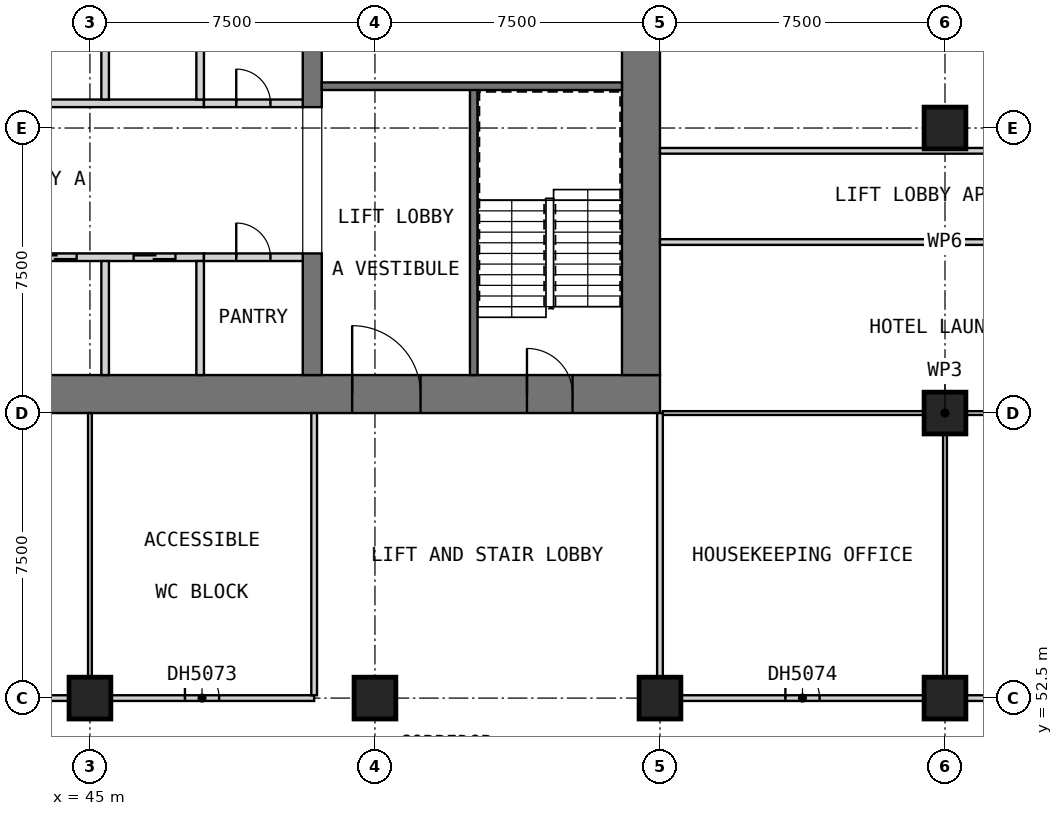
"""IFC4 building model, lengths in metres.
Left out: names, types, materials, properties, quantities, classifications, styles, units other than length and angle.
Written with IfcOpenShell. Run it as: python <this file> out.ifc"""

import sys

from ifc_helpers import new_model, si_unit, direction, frame, frame_2d, origin, origin_2d, place, context, subcontext, project, spatial, rectangle, extrude, element, fill, save


model = new_model("IFC4")
c1 = context("Model", 3, precision=1e-05, world=origin(), true_north=direction((0.0, 1.0)))
c2 = subcontext(c1, "Body", "Model", "MODEL_VIEW")
j1 = project(units=[si_unit("LENGTHUNIT", "METRE"), si_unit("PLANEANGLEUNIT", "RADIAN")], contexts=[c1])
p1 = place(None, origin())
s1 = spatial("IfcSite", under=j1, at=p1, CompositionType="ELEMENT")
p2 = place(p1, origin())
s2 = spatial("IfcBuilding", under=s1, at=p2, CompositionType="ELEMENT")
p3 = place(p2, frame((0.0, 0.0, 93.5)))
s3 = spatial("IfcBuildingStorey", under=s2, at=p3, CompositionType="ELEMENT", Elevation=93.5)
for number, where, z_axis, x_axis in (
    (1, (45.0, 52.5, 0.0), (0.0, 0.0, 1.0), (1.0, 0.0, 0.0)),
    (2, (52.5, 52.5, 0.0), (0.0, 0.0, 1.0), (1.0, 0.0, 0.0)),
    (3, (60.0, 52.5, 0.0), (0.0, 0.0, 1.0), (1.0, 0.0, 0.0)),
    (4, (67.5, 52.5, 0.0), (0.0, 0.0, 1.0), (1.0, 0.0, 0.0)),
    (5, (67.5, 60.0, 0.0), (0.0, 0.0, 1.0), (1.0, 0.0, 0.0)),
    (6, (67.5, 67.5, 0.0), (0.0, 0.0, 1.0), (1.0, 0.0, 0.0)),
):
    element("IfcColumn", number, at=place(p3, frame(where, z_axis=z_axis, x_axis=x_axis)), inside=s3, PredefinedType="COLUMN", context=c2, shape_type="SweptSolid", body=[
        extrude(rectangle(XDim=1.1, YDim=1.1, at=origin_2d()), origin(), (0.0, 0.0, 1.0), 3.6),
    ])
p4 = place(p3, frame((30.0, 60.5, 0.0), z_axis=(0.0, 0.0, 1.0), x_axis=(1.0, 0.0, 0.0)))
e7 = element("IfcWall", 7, at=p4, inside=s3, PredefinedType="SHEAR", context=c2, shape_type="SweptSolid", body=[
    extrude(rectangle(XDim=30.0, YDim=1.0, at=frame_2d((15.0, 0.0))), origin(), (0.0, 0.0, 1.0), 3.6),
])
p5 = place(p4, frame((21.9, 0.0, 0.0)))
e8 = element("IfcOpeningElement", 8, at=p5, cuts=e7, PredefinedType="OPENING", context=c2, shape_type="SweptSolid", body=[
    extrude(rectangle(XDim=1.8, YDim=2.1, at=frame_2d((0.9, 1.05))), frame((0.0, 0.51, 0.0), z_axis=(0.0, -1.0, 0.0), x_axis=(1.0, 0.0, 0.0)), (0.0, 0.0, 1.0), 1.02),
])
p6 = place(p4, frame((26.5, 0.0, 0.0)))
e9 = element("IfcOpeningElement", 9, at=p6, cuts=e7, PredefinedType="OPENING", context=c2, shape_type="SweptSolid", body=[
    extrude(rectangle(XDim=1.2, YDim=2.1, at=frame_2d((0.6, 1.05))), frame((0.0, 0.51, 0.0), z_axis=(0.0, -1.0, 0.0), x_axis=(1.0, 0.0, 0.0)), (0.0, 0.0, 1.0), 1.02),
])
p7 = place(p3, frame((59.5, 61.0, 0.0), z_axis=(0.0, 0.0, 1.0), x_axis=(0.0, 1.0, 0.0)))
e10 = element("IfcWall", 10, at=p7, inside=s3, PredefinedType="SHEAR", context=c2, shape_type="SweptSolid", body=[
    extrude(rectangle(XDim=20.5, YDim=1.0, at=frame_2d((10.25, 0.0))), origin(), (0.0, 0.0, 1.0), 3.6),
])
p8 = place(p7, frame((14.5, 0.0, 0.0)))
e11 = element("IfcOpeningElement", 11, at=p8, cuts=e10, PredefinedType="OPENING", context=c2, shape_type="SweptSolid", body=[
    extrude(rectangle(XDim=1.8, YDim=2.1, at=frame_2d((0.9, 1.05))), frame((0.0, 0.51, 0.0), z_axis=(0.0, -1.0, 0.0), x_axis=(1.0, 0.0, 0.0)), (0.0, 0.0, 1.0), 1.02),
])
p9 = place(p3, frame((50.85, 61.0, 0.0), z_axis=(0.0, 0.0, 1.0), x_axis=(0.0, 1.0, 0.0)))
e12 = element("IfcWall", 12, at=p9, inside=s3, PredefinedType="SHEAR", context=c2, shape_type="SweptSolid", body=[
    extrude(rectangle(XDim=3.2, YDim=0.5, at=frame_2d((1.6, 0.0))), origin(), (0.0, 0.0, 1.0), 3.6),
])
p10 = place(p3, frame((50.85, 68.05, 0.0), z_axis=(0.0, 0.0, 1.0), x_axis=(0.0, 1.0, 0.0)))
e13 = element("IfcWall", 13, at=p10, inside=s3, PredefinedType="SHEAR", context=c2, shape_type="SweptSolid", body=[
    extrude(rectangle(XDim=6.4, YDim=0.5, at=frame_2d((3.2, 0.0))), origin(), (0.0, 0.0, 1.0), 3.6),
])
p11 = place(p3, frame((35.0, 64.1, 0.0), z_axis=(0.0, 0.0, 1.0), x_axis=(1.0, 0.0, 0.0)))
e14 = element("IfcWall", 14, at=p11, inside=s3, PredefinedType="SOLIDWALL", context=c2, shape_type="SweptSolid", body=[
    extrude(rectangle(XDim=13.0, YDim=0.2, at=frame_2d((6.5, 0.0))), origin(), (0.0, 0.0, 1.0), 3.6),
])
p12 = place(p11, frame((0.75, 0.0, 0.0)))
e15 = element("IfcOpeningElement", 15, at=p12, cuts=e14, PredefinedType="OPENING", context=c2, shape_type="SweptSolid", body=[
    extrude(rectangle(XDim=1.1, YDim=2.1, at=frame_2d((0.55, 1.05))), frame((0.0, 0.11, 0.0), z_axis=(0.0, -1.0, 0.0), x_axis=(1.0, 0.0, 0.0)), (0.0, 0.0, 1.0), 0.22),
])
p13 = place(p11, frame((3.35, 0.0, 0.0)))
e16 = element("IfcOpeningElement", 16, at=p13, cuts=e14, PredefinedType="OPENING", context=c2, shape_type="SweptSolid", body=[
    extrude(rectangle(XDim=1.1, YDim=2.1, at=frame_2d((0.55, 1.05))), frame((0.0, 0.11, 0.0), z_axis=(0.0, -1.0, 0.0), x_axis=(1.0, 0.0, 0.0)), (0.0, 0.0, 1.0), 0.22),
])
p14 = place(p11, frame((5.95, 0.0, 0.0)))
e17 = element("IfcOpeningElement", 17, at=p14, cuts=e14, PredefinedType="OPENING", context=c2, shape_type="SweptSolid", body=[
    extrude(rectangle(XDim=1.1, YDim=2.1, at=frame_2d((0.55, 1.05))), frame((0.0, 0.11, 0.0), z_axis=(0.0, -1.0, 0.0), x_axis=(1.0, 0.0, 0.0)), (0.0, 0.0, 1.0), 0.22),
])
p15 = place(p11, frame((8.55, 0.0, 0.0)))
e18 = element("IfcOpeningElement", 18, at=p15, cuts=e14, PredefinedType="OPENING", context=c2, shape_type="SweptSolid", body=[
    extrude(rectangle(XDim=1.1, YDim=2.1, at=frame_2d((0.55, 1.05))), frame((0.0, 0.11, 0.0), z_axis=(0.0, -1.0, 0.0), x_axis=(1.0, 0.0, 0.0)), (0.0, 0.0, 1.0), 0.22),
])
p16 = place(p11, frame((11.15, 0.0, 0.0)))
e19 = element("IfcOpeningElement", 19, at=p16, cuts=e14, PredefinedType="OPENING", context=c2, shape_type="SweptSolid", body=[
    extrude(rectangle(XDim=1.1, YDim=2.1, at=frame_2d((0.55, 1.05))), frame((0.0, 0.11, 0.0), z_axis=(0.0, -1.0, 0.0), x_axis=(1.0, 0.0, 0.0)), (0.0, 0.0, 1.0), 0.22),
])
for number, where, z_axis, x_axis in (
    (20, (45.4, 61.0, 0.0), (0.0, 0.0, 1.0), (0.0, 1.0, 0.0)),
    (21, (47.9, 61.0, 0.0), (0.0, 0.0, 1.0), (0.0, 1.0, 0.0)),
):
    element("IfcWall", number, at=place(p3, frame(where, z_axis=z_axis, x_axis=x_axis)), inside=s3, PredefinedType="SOLIDWALL", context=c2, shape_type="SweptSolid", body=[
        extrude(rectangle(XDim=3.0, YDim=0.2, at=frame_2d((1.5, 0.0))), origin(), (0.0, 0.0, 1.0), 3.6),
    ])
p17 = place(p3, frame((48.0, 64.1, 0.0), z_axis=(0.0, 0.0, 1.0), x_axis=(1.0, 0.0, 0.0)))
e22 = element("IfcWall", 22, at=p17, inside=s3, PredefinedType="PARTITIONING", context=c2, shape_type="SweptSolid", body=[
    extrude(rectangle(XDim=2.6, YDim=0.2, at=frame_2d((1.3, 0.0))), origin(), (0.0, 0.0, 1.0), 3.35),
])
p18 = place(p17, frame((0.85, 0.0, 0.0)))
e23 = element("IfcOpeningElement", 23, at=p18, cuts=e22, PredefinedType="OPENING", context=c2, shape_type="SweptSolid", body=[
    extrude(rectangle(XDim=0.9, YDim=2.1, at=frame_2d((0.45, 1.05))), frame((0.0, 0.11, 0.0), z_axis=(0.0, -1.0, 0.0), x_axis=(1.0, 0.0, 0.0)), (0.0, 0.0, 1.0), 0.22),
])
p19 = place(p3, frame((35.0, 68.15, 0.0), z_axis=(0.0, 0.0, 1.0), x_axis=(1.0, 0.0, 0.0)))
e24 = element("IfcWall", 24, at=p19, inside=s3, PredefinedType="SOLIDWALL", context=c2, shape_type="SweptSolid", body=[
    extrude(rectangle(XDim=13.0, YDim=0.2, at=frame_2d((6.5, 0.0))), origin(), (0.0, 0.0, 1.0), 3.6),
])
p20 = place(p19, frame((0.75, 0.0, 0.0)))
e25 = element("IfcOpeningElement", 25, at=p20, cuts=e24, PredefinedType="OPENING", context=c2, shape_type="SweptSolid", body=[
    extrude(rectangle(XDim=1.1, YDim=2.1, at=frame_2d((0.55, 1.05))), frame((0.0, 0.11, 0.0), z_axis=(0.0, -1.0, 0.0), x_axis=(1.0, 0.0, 0.0)), (0.0, 0.0, 1.0), 0.22),
])
for number, where, z_axis, x_axis in (
    (26, (45.4, 68.25, 0.0), (0.0, 0.0, 1.0), (0.0, 1.0, 0.0)),
    (27, (47.9, 68.25, 0.0), (0.0, 0.0, 1.0), (0.0, 1.0, 0.0)),
):
    element("IfcWall", number, at=place(p3, frame(where, z_axis=z_axis, x_axis=x_axis)), inside=s3, PredefinedType="SOLIDWALL", context=c2, shape_type="SweptSolid", body=[
        extrude(rectangle(XDim=2.75, YDim=0.2, at=frame_2d((1.375, 0.0))), origin(), (0.0, 0.0, 1.0), 3.6),
    ])
p21 = place(p3, frame((48.0, 68.15, 0.0), z_axis=(0.0, 0.0, 1.0), x_axis=(1.0, 0.0, 0.0)))
e28 = element("IfcWall", 28, at=p21, inside=s3, PredefinedType="PARTITIONING", context=c2, shape_type="SweptSolid", body=[
    extrude(rectangle(XDim=2.6, YDim=0.2, at=frame_2d((1.3, 0.0))), origin(), (0.0, 0.0, 1.0), 3.35),
])
p22 = place(p21, frame((0.85, 0.0, 0.0)))
e29 = element("IfcOpeningElement", 29, at=p22, cuts=e28, PredefinedType="OPENING", context=c2, shape_type="SweptSolid", body=[
    extrude(rectangle(XDim=0.9, YDim=2.1, at=frame_2d((0.45, 1.05))), frame((0.0, 0.11, 0.0), z_axis=(0.0, -1.0, 0.0), x_axis=(1.0, 0.0, 0.0)), (0.0, 0.0, 1.0), 0.22),
])
p23 = place(p3, frame((55.1, 61.0, 0.0), z_axis=(0.0, 0.0, 1.0), x_axis=(0.0, 1.0, 0.0)))
e30 = element("IfcWall", 30, at=p23, inside=s3, PredefinedType="SOLIDWALL", context=c2, shape_type="SweptSolid", body=[
    extrude(rectangle(XDim=7.6, YDim=0.2, at=frame_2d((3.8, 0.0))), origin(), (0.0, 0.0, 1.0), 3.35),
])
p24 = place(p3, frame((51.1, 68.6, 0.0), z_axis=(0.0, 0.0, 1.0), x_axis=(1.0, 0.0, 0.0)))
e31 = element("IfcWall", 31, at=p24, inside=s3, PredefinedType="SOLIDWALL", context=c2, shape_type="SweptSolid", body=[
    extrude(rectangle(XDim=7.9, YDim=0.2, at=frame_2d((3.95, 0.0))), origin(), (0.0, 0.0, 1.0), 3.35),
])
p25 = place(p3, frame((33.75, 52.5, 0.0), z_axis=(0.0, 0.0, 1.0), x_axis=(1.0, 0.0, 0.0)))
e32 = element("IfcWall", 32, at=p25, inside=s3, PredefinedType="PARTITIONING", context=c2, shape_type="SweptSolid", body=[
    extrude(rectangle(XDim=17.15, YDim=0.15, at=frame_2d((8.575, 0.0))), origin(), (0.0, 0.0, 1.0), 3.35),
])
p26 = place(p25, frame((5.175, 0.0, 0.0)))
e33 = element("IfcOpeningElement", 33, at=p26, cuts=e32, PredefinedType="OPENING", context=c2, shape_type="SweptSolid", body=[
    extrude(rectangle(XDim=0.9, YDim=2.1, at=frame_2d((0.45, 1.05))), frame((0.0, 0.085, 0.0), z_axis=(0.0, -1.0, 0.0), x_axis=(1.0, 0.0, 0.0)), (0.0, 0.0, 1.0), 0.17),
])
p27 = place(p25, frame((13.75, 0.0, 0.0)))
e34 = element("IfcOpeningElement", 34, at=p27, cuts=e32, PredefinedType="OPENING", context=c2, shape_type="SweptSolid", body=[
    extrude(rectangle(XDim=0.9, YDim=2.1, at=frame_2d((0.45, 1.05))), frame((0.0, 0.085, 0.0), z_axis=(0.0, -1.0, 0.0), x_axis=(1.0, 0.0, 0.0)), (0.0, 0.0, 1.0), 0.17),
])
p28 = place(p3, frame((60.0, 52.5, 0.0), z_axis=(0.0, 0.0, 1.0), x_axis=(1.0, 0.0, 0.0)))
e35 = element("IfcWall", 35, at=p28, inside=s3, PredefinedType="PARTITIONING", context=c2, shape_type="SweptSolid", body=[
    extrude(rectangle(XDim=15.0, YDim=0.15, at=frame_2d((7.5, 0.0))), origin(), (0.0, 0.0, 1.0), 3.35),
])
p29 = place(p28, frame((3.3, 0.0, 0.0)))
e36 = element("IfcOpeningElement", 36, at=p29, cuts=e35, PredefinedType="OPENING", context=c2, shape_type="SweptSolid", body=[
    extrude(rectangle(XDim=0.9, YDim=2.1, at=frame_2d((0.45, 1.05))), frame((0.0, 0.085, 0.0), z_axis=(0.0, -1.0, 0.0), x_axis=(1.0, 0.0, 0.0)), (0.0, 0.0, 1.0), 0.17),
])
p30 = place(p28, frame((10.8, 0.0, 0.0)))
e37 = element("IfcOpeningElement", 37, at=p30, cuts=e35, PredefinedType="OPENING", context=c2, shape_type="SweptSolid", body=[
    extrude(rectangle(XDim=0.9, YDim=2.1, at=frame_2d((0.45, 1.05))), frame((0.0, 0.085, 0.0), z_axis=(0.0, -1.0, 0.0), x_axis=(1.0, 0.0, 0.0)), (0.0, 0.0, 1.0), 0.17),
])
p31 = place(p3, frame((60.075, 60.0, 0.0), z_axis=(0.0, 0.0, 1.0), x_axis=(1.0, 0.0, 0.0)))
e38 = element("IfcWall", 38, at=p31, inside=s3, PredefinedType="PARTITIONING", context=c2, shape_type="SweptSolid", body=[
    extrude(rectangle(XDim=14.85, YDim=0.1, at=frame_2d((7.425, 0.0))), origin(), (0.0, 0.0, 1.0), 3.35),
])
p32 = place(p3, frame((45.0, 52.575, 0.0), z_axis=(0.0, 0.0, 1.0), x_axis=(0.0, 1.0, 0.0)))
e39 = element("IfcWall", 39, at=p32, inside=s3, PredefinedType="PARTITIONING", context=c2, shape_type="SweptSolid", body=[
    extrude(rectangle(XDim=7.425, YDim=0.1, at=frame_2d((3.712, 0.0))), origin(), (0.0, 0.0, 1.0), 3.35),
])
p33 = place(p3, frame((67.5, 52.575, 0.0), z_axis=(0.0, 0.0, 1.0), x_axis=(0.0, 1.0, 0.0)))
e40 = element("IfcWall", 40, at=p33, inside=s3, PredefinedType="PARTITIONING", context=c2, shape_type="SweptSolid", body=[
    extrude(rectangle(XDim=7.375, YDim=0.1, at=frame_2d((3.688, 0.0))), origin(), (0.0, 0.0, 1.0), 3.35),
])
for number, where, z_axis, x_axis in (
    (41, (60.0, 64.5, 0.0), (0.0, 0.0, 1.0), (1.0, 0.0, 0.0)),
    (42, (60.0, 66.9, 0.0), (0.0, 0.0, 1.0), (1.0, 0.0, 0.0)),
):
    element("IfcWall", number, at=place(p3, frame(where, z_axis=z_axis, x_axis=x_axis)), inside=s3, PredefinedType="PARTITIONING", context=c2, shape_type="SweptSolid", body=[
        extrude(rectangle(XDim=15.0, YDim=0.15, at=frame_2d((7.5, 0.0))), origin(), (0.0, 0.0, 1.0), 3.35),
    ])
for number, where, z_axis, x_axis in (
    (43, (50.9, 52.575, 0.0), (0.0, 0.0, 1.0), (0.0, 1.0, 0.0)),
    (44, (60.0, 52.575, 0.0), (0.0, 0.0, 1.0), (0.0, 1.0, 0.0)),
):
    element("IfcWall", number, at=place(p3, frame(where, z_axis=z_axis, x_axis=x_axis)), inside=s3, PredefinedType="PARTITIONING", context=c2, shape_type="SweptSolid", body=[
        extrude(rectangle(XDim=7.425, YDim=0.15, at=frame_2d((3.712, 0.0))), origin(), (0.0, 0.0, 1.0), 3.35),
    ])
p34 = place(p15, origin())
e45 = element("IfcDoor", 45, at=p34, inside=s3, OperationType="DOUBLE_DOOR_SLIDING", PredefinedType="DOOR", context=c2, shape_type="SweptSolid", body=[
    extrude(rectangle(XDim=1.1, YDim=2.1, at=frame_2d((0.55, 1.05))), frame((0.0, 0.025, 0.0), z_axis=(0.0, -1.0, 0.0), x_axis=(1.0, 0.0, 0.0)), (0.0, 0.0, 1.0), 0.05),
])
fill(e18, e45)
p35 = place(p16, origin())
e46 = element("IfcDoor", 46, at=p35, inside=s3, OperationType="DOUBLE_DOOR_SLIDING", PredefinedType="DOOR", context=c2, shape_type="SweptSolid", body=[
    extrude(rectangle(XDim=1.1, YDim=2.1, at=frame_2d((0.55, 1.05))), frame((0.0, 0.025, 0.0), z_axis=(0.0, -1.0, 0.0), x_axis=(1.0, 0.0, 0.0)), (0.0, 0.0, 1.0), 0.05),
])
fill(e19, e46)
p36 = place(p18, origin())
e47 = element("IfcDoor", 47, at=p36, inside=s3, OperationType="SINGLE_SWING_RIGHT", PredefinedType="DOOR", context=c2, shape_type="SweptSolid", body=[
    extrude(rectangle(XDim=0.9, YDim=2.1, at=frame_2d((0.45, 1.05))), frame((0.0, 0.025, 0.0), z_axis=(0.0, -1.0, 0.0), x_axis=(1.0, 0.0, 0.0)), (0.0, 0.0, 1.0), 0.05),
])
fill(e23, e47)
p37 = place(p22, origin())
e48 = element("IfcDoor", 48, at=p37, inside=s3, OperationType="SINGLE_SWING_RIGHT", PredefinedType="DOOR", context=c2, shape_type="SweptSolid", body=[
    extrude(rectangle(XDim=0.9, YDim=2.1, at=frame_2d((0.45, 1.05))), frame((0.0, 0.025, 0.0), z_axis=(0.0, -1.0, 0.0), x_axis=(1.0, 0.0, 0.0)), (0.0, 0.0, 1.0), 0.05),
])
fill(e29, e48)
p38 = place(p5, origin())
e49 = element("IfcDoor", 49, at=p38, inside=s3, OperationType="DOUBLE_DOOR_SINGLE_SWING", PredefinedType="DOOR", context=c2, shape_type="SweptSolid", body=[
    extrude(rectangle(XDim=1.8, YDim=2.1, at=frame_2d((0.9, 1.05))), frame((0.0, 0.025, 0.0), z_axis=(0.0, -1.0, 0.0), x_axis=(1.0, 0.0, 0.0)), (0.0, 0.0, 1.0), 0.05),
])
fill(e8, e49)
p39 = place(p6, origin())
e50 = element("IfcDoor", 50, at=p39, inside=s3, OperationType="SINGLE_SWING_LEFT", PredefinedType="DOOR", context=c2, shape_type="SweptSolid", body=[
    extrude(rectangle(XDim=1.2, YDim=2.1, at=frame_2d((0.6, 1.05))), frame((0.0, 0.025, 0.0), z_axis=(0.0, -1.0, 0.0), x_axis=(1.0, 0.0, 0.0)), (0.0, 0.0, 1.0), 0.05),
])
fill(e9, e50)
p40 = place(p27, origin())
e51 = element("IfcDoor", 51, at=p40, inside=s3, OperationType="SINGLE_SWING_LEFT", PredefinedType="DOOR", context=c2, shape_type="SweptSolid", body=[
    extrude(rectangle(XDim=0.9, YDim=2.1, at=frame_2d((0.45, 1.05))), frame((0.0, 0.025, 0.0), z_axis=(0.0, -1.0, 0.0), x_axis=(1.0, 0.0, 0.0)), (0.0, 0.0, 1.0), 0.05),
])
fill(e34, e51)
p41 = place(p29, origin())
e52 = element("IfcDoor", 52, at=p41, inside=s3, OperationType="SINGLE_SWING_LEFT", PredefinedType="DOOR", context=c2, shape_type="SweptSolid", body=[
    extrude(rectangle(XDim=0.9, YDim=2.1, at=frame_2d((0.45, 1.05))), frame((0.0, 0.025, 0.0), z_axis=(0.0, -1.0, 0.0), x_axis=(1.0, 0.0, 0.0)), (0.0, 0.0, 1.0), 0.05),
])
fill(e36, e52)
save(model, sys.argv[1])
